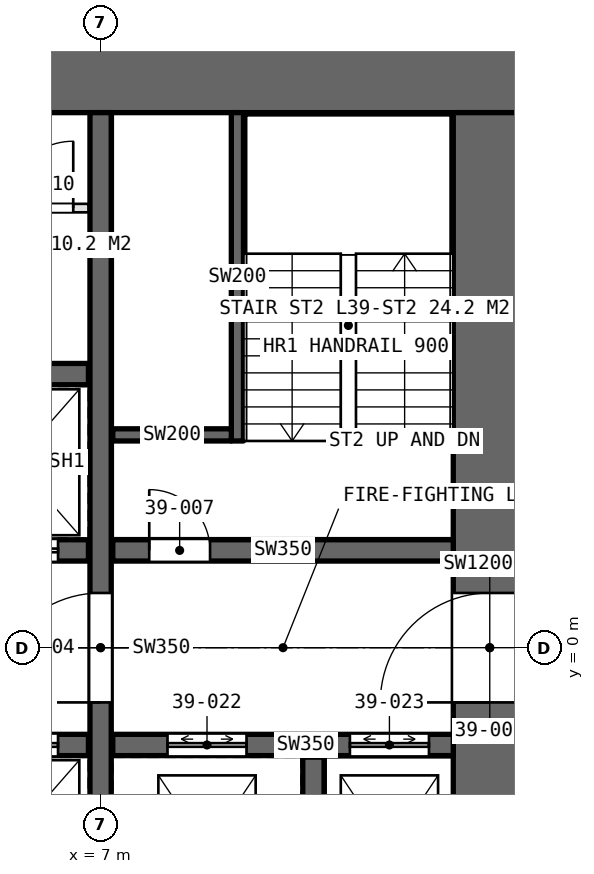
"""IFC4 building model, lengths in metres.
Left out: names, types, materials, properties, quantities, classifications, styles, units other than length and angle.
Written with IfcOpenShell. Run it as: python <this file> out.ifc"""

import sys

from ifc_helpers import new_model, si_unit, direction, frame, frame_2d, origin, place, context, subcontext, project, spatial, rectangle, extrude, element, fill, save


model = new_model("IFC4")
c1 = context("Model", 3, precision=1e-05, world=origin(), true_north=direction((0.0, 1.0)))
c2 = subcontext(c1, "Body", "Model", "MODEL_VIEW")
j1 = project(units=[si_unit("LENGTHUNIT", "METRE"), si_unit("PLANEANGLEUNIT", "RADIAN")], contexts=[c1])
p1 = place(None, origin())
s1 = spatial("IfcSite", under=j1, at=p1, CompositionType="ELEMENT")
p2 = place(p1, origin())
s2 = spatial("IfcBuilding", under=s1, at=p2, CompositionType="ELEMENT")
p3 = place(p2, frame((0.0, 0.0, 180.6)))
s3 = spatial("IfcBuildingStorey", under=s2, at=p3, CompositionType="ELEMENT", Elevation=180.6)
p4 = place(p3, frame((14.0, 9.4, 0.0), z_axis=(0.0, 0.0, 1.0), x_axis=(-1.0, 0.0, 0.0)))
e1 = element("IfcWall", 1, at=p4, inside=s3, PredefinedType="SHEAR", context=c2, shape_type="SweptSolid", body=[
    extrude(rectangle(XDim=28.0, YDim=1.2, at=frame_2d((14.0, 0.0))), origin(), (0.0, 0.0, 1.0), 4.2),
])
p5 = place(p4, frame((24.0, 0.0, 0.0)))
e2 = element("IfcOpeningElement", 2, at=p5, cuts=e1, PredefinedType="OPENING", context=c2, shape_type="SweptSolid", body=[
    extrude(rectangle(XDim=1.0, YDim=2.4, at=frame_2d((0.5, 1.2))), frame((0.0, 0.61, 0.0), z_axis=(0.0, -1.0, 0.0), x_axis=(1.0, 0.0, 0.0)), (0.0, 0.0, 1.0), 1.22),
])
p6 = place(p4, frame((13.1, 0.0, 0.0)))
e3 = element("IfcOpeningElement", 3, at=p6, cuts=e1, PredefinedType="OPENING", context=c2, shape_type="SweptSolid", body=[
    extrude(rectangle(XDim=1.8, YDim=2.4, at=frame_2d((0.9, 1.2))), frame((0.0, 0.61, 0.0), z_axis=(0.0, -1.0, 0.0), x_axis=(1.0, 0.0, 0.0)), (0.0, 0.0, 1.0), 1.22),
])
p7 = place(p3, frame((13.4, -8.8, 0.0), z_axis=(0.0, 0.0, 1.0), x_axis=(0.0, 1.0, 0.0)))
e4 = element("IfcWall", 4, at=p7, inside=s3, PredefinedType="SHEAR", context=c2, shape_type="SweptSolid", body=[
    extrude(rectangle(XDim=17.6, YDim=1.2, at=frame_2d((8.8, 0.0))), origin(), (0.0, 0.0, 1.0), 4.2),
])
p8 = place(p7, frame((7.9, 0.0, 0.0)))
e5 = element("IfcOpeningElement", 5, at=p8, cuts=e4, PredefinedType="OPENING", context=c2, shape_type="SweptSolid", body=[
    extrude(rectangle(XDim=1.8, YDim=2.4, at=frame_2d((0.9, 1.2))), frame((0.0, 0.61, 0.0), z_axis=(0.0, -1.0, 0.0), x_axis=(1.0, 0.0, 0.0)), (0.0, 0.0, 1.0), 1.22),
])
p9 = place(p3, frame((7.0, -8.8, 0.0), z_axis=(0.0, 0.0, 1.0), x_axis=(0.0, 1.0, 0.0)))
e6 = element("IfcWall", 6, at=p9, inside=s3, PredefinedType="SHEAR", context=c2, shape_type="SweptSolid", body=[
    extrude(rectangle(XDim=17.6, YDim=0.35, at=frame_2d((8.8, 0.0))), origin(), (0.0, 0.0, 1.0), 4.2),
])
p10 = place(p9, frame((7.9, 0.0, 0.0)))
e7 = element("IfcOpeningElement", 7, at=p10, cuts=e6, PredefinedType="OPENING", context=c2, shape_type="SweptSolid", body=[
    extrude(rectangle(XDim=1.8, YDim=2.4, at=frame_2d((0.9, 1.2))), frame((0.0, 0.185, 0.0), z_axis=(0.0, -1.0, 0.0), x_axis=(1.0, 0.0, 0.0)), (0.0, 0.0, 1.0), 0.37),
])
p11 = place(p3, frame((-6.8, 1.6, 0.0), z_axis=(0.0, 0.0, 1.0), x_axis=(1.0, 0.0, 0.0)))
e8 = element("IfcWall", 8, at=p11, inside=s3, PredefinedType="SHEAR", context=c2, shape_type="SweptSolid", body=[
    extrude(rectangle(XDim=13.6, YDim=0.35, at=frame_2d((6.8, 0.0))), origin(), (0.0, 0.0, 1.0), 4.2),
])
p12 = place(p11, frame((1.315, 0.0, 0.0)))
e9 = element("IfcOpeningElement", 9, at=p12, cuts=e8, PredefinedType="OPENING", context=c2, shape_type="SweptSolid", body=[
    extrude(rectangle(XDim=0.9, YDim=2.4, at=frame_2d((0.45, 1.2))), frame((0.0, 0.185, 0.0), z_axis=(0.0, -1.0, 0.0), x_axis=(1.0, 0.0, 0.0)), (0.0, 0.0, 1.0), 0.37),
])
p13 = place(p11, frame((4.05, 0.0, 0.0)))
e10 = element("IfcOpeningElement", 10, at=p13, cuts=e8, PredefinedType="OPENING", context=c2, shape_type="SweptSolid", body=[
    extrude(rectangle(XDim=0.9, YDim=2.4, at=frame_2d((0.45, 1.2))), frame((0.0, 0.185, 0.0), z_axis=(0.0, -1.0, 0.0), x_axis=(1.0, 0.0, 0.0)), (0.0, 0.0, 1.0), 0.37),
])
p14 = place(p11, frame((7.685, 0.0, 0.0)))
e11 = element("IfcOpeningElement", 11, at=p14, cuts=e8, PredefinedType="OPENING", context=c2, shape_type="SweptSolid", body=[
    extrude(rectangle(XDim=0.9, YDim=2.4, at=frame_2d((0.45, 1.2))), frame((0.0, 0.185, 0.0), z_axis=(0.0, -1.0, 0.0), x_axis=(1.0, 0.0, 0.0)), (0.0, 0.0, 1.0), 0.37),
])
p15 = place(p11, frame((11.8, 0.0, 0.0)))
e12 = element("IfcOpeningElement", 12, at=p15, cuts=e8, PredefinedType="OPENING", context=c2, shape_type="SweptSolid", body=[
    extrude(rectangle(XDim=1.3, YDim=2.4, at=frame_2d((0.65, 1.2))), frame((0.0, 0.185, 0.0), z_axis=(0.0, -1.0, 0.0), x_axis=(1.0, 0.0, 0.0)), (0.0, 0.0, 1.0), 0.37),
])
p16 = place(p3, frame((-6.8, -1.6, 0.0), z_axis=(0.0, 0.0, 1.0), x_axis=(1.0, 0.0, 0.0)))
e13 = element("IfcWall", 13, at=p16, inside=s3, PredefinedType="SHEAR", context=c2, shape_type="SweptSolid", body=[
    extrude(rectangle(XDim=13.6, YDim=0.35, at=frame_2d((6.8, 0.0))), origin(), (0.0, 0.0, 1.0), 4.2),
])
p17 = place(p16, frame((11.8, 0.0, 0.0)))
e14 = element("IfcOpeningElement", 14, at=p17, cuts=e13, PredefinedType="OPENING", context=c2, shape_type="SweptSolid", body=[
    extrude(rectangle(XDim=1.3, YDim=2.4, at=frame_2d((0.65, 1.2))), frame((0.0, 0.185, 0.0), z_axis=(0.0, -1.0, 0.0), x_axis=(1.0, 0.0, 0.0)), (0.0, 0.0, 1.0), 0.37),
])
p18 = place(p3, frame((-6.8, 4.5, 0.0), z_axis=(0.0, 0.0, 1.0), x_axis=(1.0, 0.0, 0.0)))
e15 = element("IfcWall", 15, at=p18, inside=s3, PredefinedType="SHEAR", context=c2, shape_type="SweptSolid", body=[
    extrude(rectangle(XDim=13.6, YDim=0.35, at=frame_2d((6.8, 0.0))), origin(), (0.0, 0.0, 1.0), 4.2),
])
p19 = place(p3, frame((7.2, 1.6, 0.0), z_axis=(0.0, 0.0, 1.0), x_axis=(1.0, 0.0, 0.0)))
e16 = element("IfcWall", 16, at=p19, inside=s3, PredefinedType="SHEAR", context=c2, shape_type="SweptSolid", body=[
    extrude(rectangle(XDim=5.6, YDim=0.35, at=frame_2d((2.8, 0.0))), origin(), (0.0, 0.0, 1.0), 4.2),
])
p20 = place(p19, frame((0.6, 0.0, 0.0)))
e17 = element("IfcOpeningElement", 17, at=p20, cuts=e16, PredefinedType="OPENING", context=c2, shape_type="SweptSolid", body=[
    extrude(rectangle(XDim=1.0, YDim=2.4, at=frame_2d((0.5, 1.2))), frame((0.0, 0.185, 0.0), z_axis=(0.0, -1.0, 0.0), x_axis=(1.0, 0.0, 0.0)), (0.0, 0.0, 1.0), 0.37),
])
p21 = place(p3, frame((7.2, -1.6, 0.0), z_axis=(0.0, 0.0, 1.0), x_axis=(1.0, 0.0, 0.0)))
e18 = element("IfcWall", 18, at=p21, inside=s3, PredefinedType="SHEAR", context=c2, shape_type="SweptSolid", body=[
    extrude(rectangle(XDim=5.6, YDim=0.35, at=frame_2d((2.8, 0.0))), origin(), (0.0, 0.0, 1.0), 4.2),
])
p22 = place(p21, frame((0.9, 0.0, 0.0)))
e19 = element("IfcOpeningElement", 19, at=p22, cuts=e18, PredefinedType="OPENING", context=c2, shape_type="SweptSolid", body=[
    extrude(rectangle(XDim=1.3, YDim=2.4, at=frame_2d((0.65, 1.2))), frame((0.0, 0.185, 0.0), z_axis=(0.0, -1.0, 0.0), x_axis=(1.0, 0.0, 0.0)), (0.0, 0.0, 1.0), 0.37),
])
p23 = place(p21, frame((3.9, 0.0, 0.0)))
e20 = element("IfcOpeningElement", 20, at=p23, cuts=e18, PredefinedType="OPENING", context=c2, shape_type="SweptSolid", body=[
    extrude(rectangle(XDim=1.3, YDim=2.4, at=frame_2d((0.65, 1.2))), frame((0.0, 0.185, 0.0), z_axis=(0.0, -1.0, 0.0), x_axis=(1.0, 0.0, 0.0)), (0.0, 0.0, 1.0), 0.37),
])
p24 = place(p3, frame((10.5, -4.8, 0.0), z_axis=(0.0, 0.0, 1.0), x_axis=(0.0, 1.0, 0.0)))
e21 = element("IfcWall", 21, at=p24, inside=s3, PredefinedType="SHEAR", context=c2, shape_type="SweptSolid", body=[
    extrude(rectangle(XDim=3.0, YDim=0.35, at=frame_2d((1.5, 0.0))), origin(), (0.0, 0.0, 1.0), 4.2),
])
p25 = place(p3, frame((-6.8, 7.23, 0.0), z_axis=(0.0, 0.0, 1.0), x_axis=(1.0, 0.0, 0.0)))
e22 = element("IfcWall", 22, at=p25, inside=s3, PredefinedType="PARTITIONING", context=c2, shape_type="SweptSolid", body=[
    extrude(rectangle(XDim=13.6, YDim=0.14, at=frame_2d((6.8, 0.0))), origin(), (0.0, 0.0, 1.0), 3.95),
])
p26 = place(p25, frame((3.28, 0.0, 0.0)))
e23 = element("IfcOpeningElement", 23, at=p26, cuts=e22, PredefinedType="OPENING", context=c2, shape_type="SweptSolid", body=[
    extrude(rectangle(XDim=1.0, YDim=2.4, at=frame_2d((0.5, 1.2))), frame((0.0, 0.08, 0.0), z_axis=(0.0, -1.0, 0.0), x_axis=(1.0, 0.0, 0.0)), (0.0, 0.0, 1.0), 0.16),
])
p27 = place(p25, frame((8.08, 0.0, 0.0)))
e24 = element("IfcOpeningElement", 24, at=p27, cuts=e22, PredefinedType="OPENING", context=c2, shape_type="SweptSolid", body=[
    extrude(rectangle(XDim=1.0, YDim=2.4, at=frame_2d((0.5, 1.2))), frame((0.0, 0.08, 0.0), z_axis=(0.0, -1.0, 0.0), x_axis=(1.0, 0.0, 0.0)), (0.0, 0.0, 1.0), 0.16),
])
p28 = place(p25, frame((12.25, 0.0, 0.0)))
e25 = element("IfcOpeningElement", 25, at=p28, cuts=e22, PredefinedType="OPENING", context=c2, shape_type="SweptSolid", body=[
    extrude(rectangle(XDim=1.1, YDim=2.4, at=frame_2d((0.55, 1.2))), frame((0.0, 0.08, 0.0), z_axis=(0.0, -1.0, 0.0), x_axis=(1.0, 0.0, 0.0)), (0.0, 0.0, 1.0), 0.16),
])
p29 = place(p3, frame((9.25, 3.4, 0.0), z_axis=(0.0, 0.0, 1.0), x_axis=(0.0, 1.0, 0.0)))
e26 = element("IfcWall", 26, at=p29, inside=s3, PredefinedType="SOLIDWALL", context=c2, shape_type="SweptSolid", body=[
    extrude(rectangle(XDim=5.4, YDim=0.2, at=frame_2d((2.7, 0.0))), origin(), (0.0, 0.0, 1.0), 4.2),
])
p30 = place(p3, frame((9.15, 3.5, 0.0), z_axis=(0.0, 0.0, 1.0), x_axis=(-1.0, 0.0, 0.0)))
e27 = element("IfcWall", 27, at=p30, inside=s3, PredefinedType="SOLIDWALL", context=c2, shape_type="SweptSolid", body=[
    extrude(rectangle(XDim=1.95, YDim=0.2, at=frame_2d((0.975, 0.0))), origin(), (0.0, 0.0, 1.0), 4.2),
])
p31 = place(p8, origin())
e28 = element("IfcDoor", 28, at=p31, inside=s3, OperationType="DOUBLE_DOOR_SINGLE_SWING", PredefinedType="DOOR", context=c2, shape_type="SweptSolid", body=[
    extrude(rectangle(XDim=1.8, YDim=2.4, at=frame_2d((0.9, 1.2))), frame((0.0, 0.025, 0.0), z_axis=(0.0, -1.0, 0.0), x_axis=(1.0, 0.0, 0.0)), (0.0, 0.0, 1.0), 0.05),
])
fill(e5, e28)
p32 = place(p10, origin())
e29 = element("IfcDoor", 29, at=p32, inside=s3, OperationType="DOUBLE_DOOR_SINGLE_SWING", PredefinedType="DOOR", context=c2, shape_type="SweptSolid", body=[
    extrude(rectangle(XDim=1.8, YDim=2.4, at=frame_2d((0.9, 1.2))), frame((0.0, 0.025, 0.0), z_axis=(0.0, -1.0, 0.0), x_axis=(1.0, 0.0, 0.0)), (0.0, 0.0, 1.0), 0.05),
])
fill(e7, e29)
p33 = place(p20, origin())
e30 = element("IfcDoor", 30, at=p33, inside=s3, OperationType="SINGLE_SWING_LEFT", PredefinedType="DOOR", context=c2, shape_type="SweptSolid", body=[
    extrude(rectangle(XDim=1.0, YDim=2.4, at=frame_2d((0.5, 1.2))), frame((0.0, 0.025, 0.0), z_axis=(0.0, -1.0, 0.0), x_axis=(1.0, 0.0, 0.0)), (0.0, 0.0, 1.0), 0.05),
])
fill(e17, e30)
p34 = place(p28, origin())
e31 = element("IfcDoor", 31, at=p34, inside=s3, OperationType="SINGLE_SWING_RIGHT", PredefinedType="DOOR", context=c2, shape_type="SweptSolid", body=[
    extrude(rectangle(XDim=1.1, YDim=2.4, at=frame_2d((0.55, 1.2))), frame((0.0, 0.025, 0.0), z_axis=(0.0, -1.0, 0.0), x_axis=(1.0, 0.0, 0.0)), (0.0, 0.0, 1.0), 0.05),
])
fill(e25, e31)
p35 = place(p15, origin())
e32 = element("IfcDoor", 32, at=p35, inside=s3, OperationType="DOUBLE_DOOR_SLIDING", PredefinedType="DOOR", context=c2, shape_type="SweptSolid", body=[
    extrude(rectangle(XDim=1.3, YDim=2.4, at=frame_2d((0.65, 1.2))), frame((0.0, 0.025, 0.0), z_axis=(0.0, -1.0, 0.0), x_axis=(1.0, 0.0, 0.0)), (0.0, 0.0, 1.0), 0.05),
])
fill(e12, e32)
p36 = place(p17, origin())
e33 = element("IfcDoor", 33, at=p36, inside=s3, OperationType="DOUBLE_DOOR_SLIDING", PredefinedType="DOOR", context=c2, shape_type="SweptSolid", body=[
    extrude(rectangle(XDim=1.3, YDim=2.4, at=frame_2d((0.65, 1.2))), frame((0.0, 0.025, 0.0), z_axis=(0.0, -1.0, 0.0), x_axis=(1.0, 0.0, 0.0)), (0.0, 0.0, 1.0), 0.05),
])
fill(e14, e33)
p37 = place(p22, origin())
e34 = element("IfcDoor", 34, at=p37, inside=s3, OperationType="DOUBLE_DOOR_SLIDING", PredefinedType="DOOR", context=c2, shape_type="SweptSolid", body=[
    extrude(rectangle(XDim=1.3, YDim=2.4, at=frame_2d((0.65, 1.2))), frame((0.0, 0.025, 0.0), z_axis=(0.0, -1.0, 0.0), x_axis=(1.0, 0.0, 0.0)), (0.0, 0.0, 1.0), 0.05),
])
fill(e19, e34)
p38 = place(p23, origin())
e35 = element("IfcDoor", 35, at=p38, inside=s3, OperationType="DOUBLE_DOOR_SLIDING", PredefinedType="DOOR", context=c2, shape_type="SweptSolid", body=[
    extrude(rectangle(XDim=1.3, YDim=2.4, at=frame_2d((0.65, 1.2))), frame((0.0, 0.025, 0.0), z_axis=(0.0, -1.0, 0.0), x_axis=(1.0, 0.0, 0.0)), (0.0, 0.0, 1.0), 0.05),
])
fill(e20, e35)
save(model, sys.argv[1])
